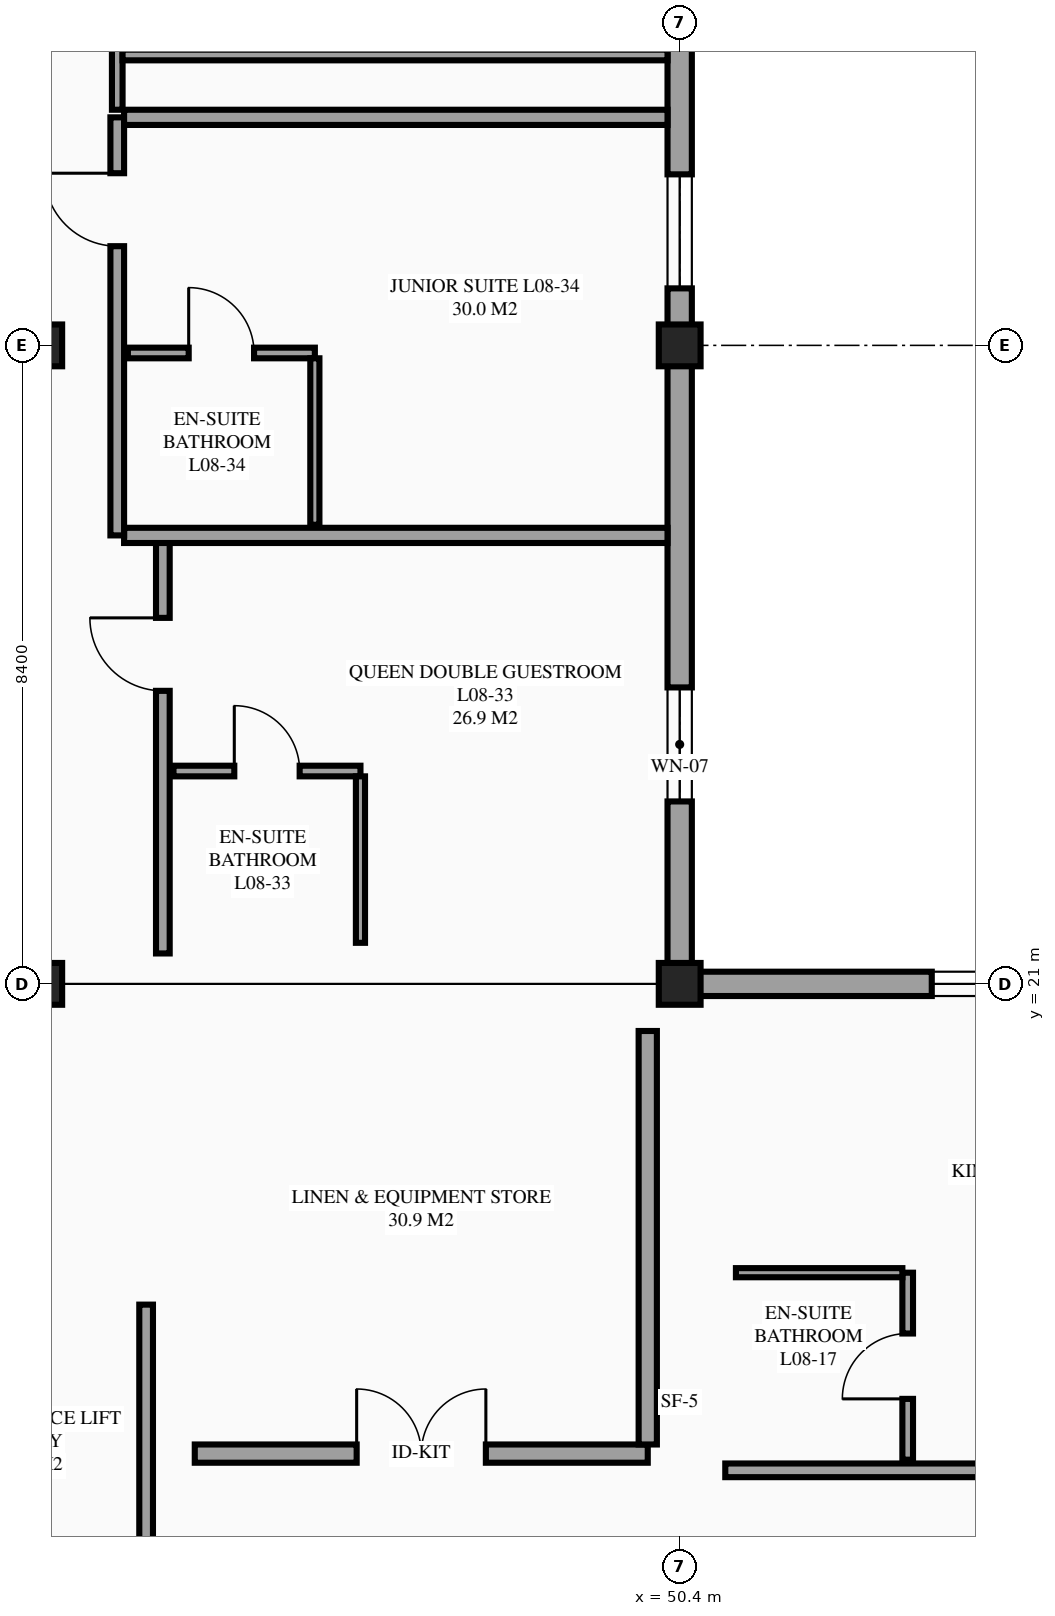
"""IFC4 building model, lengths in metres.
Left out: names, types, materials, properties, quantities, classifications, styles, units other than length and angle.
Written with IfcOpenShell. Run it as: python <this file> out.ifc"""

import sys

from ifc_helpers import new_model, si_unit, direction, frame, frame_2d, origin, origin_2d, place, context, subcontext, project, spatial, rectangle, extrude, element, fill, save


model = new_model("IFC4")
c1 = context("Model", 3, precision=1e-05, world=origin(), true_north=direction((0.0, 1.0)))
c2 = subcontext(c1, "Body", "Model", "MODEL_VIEW")
j1 = project(units=[si_unit("LENGTHUNIT", "METRE"), si_unit("PLANEANGLEUNIT", "RADIAN")], contexts=[c1])
p1 = place(None, origin())
s1 = spatial("IfcSite", under=j1, at=p1, CompositionType="ELEMENT")
p2 = place(p1, origin())
s2 = spatial("IfcBuilding", under=s1, at=p2, CompositionType="ELEMENT")
p3 = place(p2, frame((0.0, 0.0, 32.7)))
s3 = spatial("IfcBuildingStorey", under=s2, at=p3, CompositionType="ELEMENT", Elevation=32.7)
for number, where, z_axis, x_axis in (
    (1, (42.0, 21.0, 0.0), (0.0, 0.0, 1.0), (1.0, 0.0, 0.0)),
    (2, (42.0, 29.4, 0.0), (0.0, 0.0, 1.0), (1.0, 0.0, 0.0)),
    (3, (50.4, 21.0, 0.0), (0.0, 0.0, 1.0), (1.0, 0.0, 0.0)),
    (4, (50.4, 29.4, 0.0), (0.0, 0.0, 1.0), (1.0, 0.0, 0.0)),
):
    element("IfcColumn", number, at=place(p3, frame(where, z_axis=z_axis, x_axis=x_axis)), inside=s3, PredefinedType="COLUMN", context=c2, shape_type="SweptSolid", body=[
        extrude(rectangle(XDim=0.55, YDim=0.55, at=origin_2d()), origin(), (0.0, 0.0, 1.0), 3.6),
    ])
p4 = place(p3, frame((50.4, 21.0, 0.0), z_axis=(0.0, 0.0, 1.0), x_axis=(0.0, 1.0, 0.0)))
e5 = element("IfcWall", 5, at=p4, inside=s3, PredefinedType="STANDARD", context=c2, shape_type="SweptSolid", body=[
    extrude(rectangle(XDim=16.8, YDim=0.32, at=frame_2d((8.4, 0.0))), origin(), (0.0, 0.0, 1.0), 2.48),
])
p5 = place(p4, frame((2.4, 0.0, 0.85)))
e6 = element("IfcOpeningElement", 6, at=p5, cuts=e5, PredefinedType="OPENING", context=c2, shape_type="SweptSolid", body=[
    extrude(rectangle(XDim=1.5, YDim=1.5, at=frame_2d((0.75, 0.75))), frame((0.0, 0.17, 0.0), z_axis=(0.0, -1.0, 0.0), x_axis=(1.0, 0.0, 0.0)), (0.0, 0.0, 1.0), 0.34),
])
p6 = place(p4, frame((9.15, 0.0, 0.85)))
e7 = element("IfcOpeningElement", 7, at=p6, cuts=e5, PredefinedType="OPENING", context=c2, shape_type="SweptSolid", body=[
    extrude(rectangle(XDim=1.5, YDim=1.5, at=frame_2d((0.75, 0.75))), frame((0.0, 0.17, 0.0), z_axis=(0.0, -1.0, 0.0), x_axis=(1.0, 0.0, 0.0)), (0.0, 0.0, 1.0), 0.34),
])
p7 = place(p3, frame((51.0, 14.6, 0.0), z_axis=(0.0, 0.0, 1.0), x_axis=(1.0, 0.0, 0.0)))
e8 = element("IfcWall", 8, at=p7, inside=s3, PredefinedType="PARTITIONING", context=c2, shape_type="SweptSolid", body=[
    extrude(rectangle(XDim=6.933, YDim=0.18, at=frame_2d((3.467, 0.0))), origin(), (0.0, 0.0, 1.0), 3.375),
])
p8 = place(p7, frame((4.686, 0.0, 0.0)))
e9 = element("IfcOpeningElement", 9, at=p8, cuts=e8, PredefinedType="OPENING", context=c2, shape_type="SweptSolid", body=[
    extrude(rectangle(XDim=0.96, YDim=2.15, at=frame_2d((0.48, 1.075))), frame((0.0, 0.1, 0.0), z_axis=(0.0, -1.0, 0.0), x_axis=(1.0, 0.0, 0.0)), (0.0, 0.0, 1.0), 0.2),
])
p9 = place(p3, frame((53.4, 14.74, 0.0), z_axis=(0.0, 0.0, 1.0), x_axis=(0.0, 1.0, 0.0)))
e10 = element("IfcWall", 10, at=p9, inside=s3, PredefinedType="PARTITIONING", context=c2, shape_type="SweptSolid", body=[
    extrude(rectangle(XDim=2.46, YDim=0.14, at=frame_2d((1.23, 0.0))), origin(), (0.0, 0.0, 1.0), 3.375),
])
p10 = place(p9, frame((0.8, 0.0, 0.0)))
e11 = element("IfcOpeningElement", 11, at=p10, cuts=e10, PredefinedType="OPENING", context=c2, shape_type="SweptSolid", body=[
    extrude(rectangle(XDim=0.86, YDim=2.1, at=frame_2d((0.43, 1.05))), frame((0.0, 0.08, 0.0), z_axis=(0.0, -1.0, 0.0), x_axis=(1.0, 0.0, 0.0)), (0.0, 0.0, 1.0), 0.16),
])
p11 = place(p3, frame((51.14, 17.2, 0.0), z_axis=(0.0, 0.0, 1.0), x_axis=(1.0, 0.0, 0.0)))
e12 = element("IfcWall", 12, at=p11, inside=s3, PredefinedType="PARTITIONING", context=c2, shape_type="SweptSolid", body=[
    extrude(rectangle(XDim=2.19, YDim=0.12, at=frame_2d((1.095, 0.0))), origin(), (0.0, 0.0, 1.0), 3.375),
])
p12 = place(p3, frame((43.6, 21.4, 0.0), z_axis=(0.0, 0.0, 1.0), x_axis=(0.0, 1.0, 0.0)))
e13 = element("IfcWall", 13, at=p12, inside=s3, PredefinedType="PARTITIONING", context=c2, shape_type="SweptSolid", body=[
    extrude(rectangle(XDim=5.5, YDim=0.18, at=frame_2d((2.75, 0.0))), origin(), (0.0, 0.0, 1.0), 3.375),
])
p13 = place(p12, frame((3.455, 0.0, 0.0)))
e14 = element("IfcOpeningElement", 14, at=p13, cuts=e13, PredefinedType="OPENING", context=c2, shape_type="SweptSolid", body=[
    extrude(rectangle(XDim=0.96, YDim=2.15, at=frame_2d((0.48, 1.075))), frame((0.0, 0.1, 0.0), z_axis=(0.0, -1.0, 0.0), x_axis=(1.0, 0.0, 0.0)), (0.0, 0.0, 1.0), 0.2),
])
p14 = place(p3, frame((43.09, 26.9, 0.0), z_axis=(0.0, 0.0, 1.0), x_axis=(1.0, 0.0, 0.0)))
e15 = element("IfcWall", 15, at=p14, inside=s3, PredefinedType="PARTITIONING", context=c2, shape_type="SweptSolid", body=[
    extrude(rectangle(XDim=7.15, YDim=0.2, at=frame_2d((3.575, 0.0))), origin(), (0.0, 0.0, 1.0), 3.375),
])
p15 = place(p3, frame((43.74, 23.8, 0.0), z_axis=(0.0, 0.0, 1.0), x_axis=(1.0, 0.0, 0.0)))
e16 = element("IfcWall", 16, at=p15, inside=s3, PredefinedType="PARTITIONING", context=c2, shape_type="SweptSolid", body=[
    extrude(rectangle(XDim=2.46, YDim=0.14, at=frame_2d((1.23, 0.0))), origin(), (0.0, 0.0, 1.0), 3.375),
])
p16 = place(p15, frame((0.8, 0.0, 0.0)))
e17 = element("IfcOpeningElement", 17, at=p16, cuts=e16, PredefinedType="OPENING", context=c2, shape_type="SweptSolid", body=[
    extrude(rectangle(XDim=0.86, YDim=2.1, at=frame_2d((0.43, 1.05))), frame((0.0, 0.08, 0.0), z_axis=(0.0, -1.0, 0.0), x_axis=(1.0, 0.0, 0.0)), (0.0, 0.0, 1.0), 0.16),
])
p17 = place(p3, frame((46.2, 21.54, 0.0), z_axis=(0.0, 0.0, 1.0), x_axis=(0.0, 1.0, 0.0)))
e18 = element("IfcWall", 18, at=p17, inside=s3, PredefinedType="PARTITIONING", context=c2, shape_type="SweptSolid", body=[
    extrude(rectangle(XDim=2.19, YDim=0.12, at=frame_2d((1.095, 0.0))), origin(), (0.0, 0.0, 1.0), 3.375),
])
p18 = place(p3, frame((43.0, 26.9, 0.0), z_axis=(0.0, 0.0, 1.0), x_axis=(0.0, 1.0, 0.0)))
e19 = element("IfcWall", 19, at=p18, inside=s3, PredefinedType="PARTITIONING", context=c2, shape_type="SweptSolid", body=[
    extrude(rectangle(XDim=5.5, YDim=0.18, at=frame_2d((2.75, 0.0))), origin(), (0.0, 0.0, 1.0), 3.375),
])
p19 = place(p18, frame((3.805, 0.0, 0.0)))
e20 = element("IfcOpeningElement", 20, at=p19, cuts=e19, PredefinedType="OPENING", context=c2, shape_type="SweptSolid", body=[
    extrude(rectangle(XDim=0.96, YDim=2.15, at=frame_2d((0.48, 1.075))), frame((0.0, 0.1, 0.0), z_axis=(0.0, -1.0, 0.0), x_axis=(1.0, 0.0, 0.0)), (0.0, 0.0, 1.0), 0.2),
])
p20 = place(p3, frame((43.09, 32.4, 0.0), z_axis=(0.0, 0.0, 1.0), x_axis=(1.0, 0.0, 0.0)))
e21 = element("IfcWall", 21, at=p20, inside=s3, PredefinedType="PARTITIONING", context=c2, shape_type="SweptSolid", body=[
    extrude(rectangle(XDim=7.15, YDim=0.2, at=frame_2d((3.575, 0.0))), origin(), (0.0, 0.0, 1.0), 3.375),
])
p21 = place(p3, frame((43.14, 29.3, 0.0), z_axis=(0.0, 0.0, 1.0), x_axis=(1.0, 0.0, 0.0)))
e22 = element("IfcWall", 22, at=p21, inside=s3, PredefinedType="PARTITIONING", context=c2, shape_type="SweptSolid", body=[
    extrude(rectangle(XDim=2.46, YDim=0.14, at=frame_2d((1.23, 0.0))), origin(), (0.0, 0.0, 1.0), 2.68),
])
p22 = place(p21, frame((0.8, 0.0, 0.0)))
e23 = element("IfcOpeningElement", 23, at=p22, cuts=e22, PredefinedType="OPENING", context=c2, shape_type="SweptSolid", body=[
    extrude(rectangle(XDim=0.86, YDim=2.1, at=frame_2d((0.43, 1.05))), frame((0.0, 0.08, 0.0), z_axis=(0.0, -1.0, 0.0), x_axis=(1.0, 0.0, 0.0)), (0.0, 0.0, 1.0), 0.16),
])
p23 = place(p3, frame((45.6, 27.04, 0.0), z_axis=(0.0, 0.0, 1.0), x_axis=(0.0, 1.0, 0.0)))
e24 = element("IfcWall", 24, at=p23, inside=s3, PredefinedType="PARTITIONING", context=c2, shape_type="SweptSolid", body=[
    extrude(rectangle(XDim=2.19, YDim=0.12, at=frame_2d((1.095, 0.0))), origin(), (0.0, 0.0, 1.0), 3.375),
])
p24 = place(p3, frame((43.38, 12.91, 0.0), z_axis=(0.0, 0.0, 1.0), x_axis=(0.0, 1.0, 0.0)))
e25 = element("IfcWall", 25, at=p24, inside=s3, PredefinedType="PARTITIONING", context=c2, shape_type="SweptSolid", body=[
    extrude(rectangle(XDim=3.87, YDim=0.18, at=frame_2d((1.935, 0.0))), origin(), (0.0, 0.0, 1.0), 3.375),
])
p25 = place(p3, frame((44.02, 14.82, 0.0), z_axis=(0.0, 0.0, 1.0), x_axis=(1.0, 0.0, 0.0)))
e26 = element("IfcWall", 26, at=p25, inside=s3, PredefinedType="PARTITIONING", context=c2, shape_type="SweptSolid", body=[
    extrude(rectangle(XDim=5.96, YDim=0.24, at=frame_2d((2.98, 0.0))), origin(), (0.0, 0.0, 1.0), 3.375),
])
p26 = place(p25, frame((2.13, 0.0, 0.0)))
e27 = element("IfcOpeningElement", 27, at=p26, cuts=e26, PredefinedType="OPENING", context=c2, shape_type="SweptSolid", body=[
    extrude(rectangle(XDim=1.7, YDim=2.2, at=frame_2d((0.85, 1.1))), frame((0.0, 0.13, 0.0), z_axis=(0.0, -1.0, 0.0), x_axis=(1.0, 0.0, 0.0)), (0.0, 0.0, 1.0), 0.26),
])
p27 = place(p3, frame((49.98, 14.94, 0.0), z_axis=(0.0, 0.0, 1.0), x_axis=(0.0, 1.0, 0.0)))
e28 = element("IfcWall", 28, at=p27, inside=s3, PredefinedType="PARTITIONING", context=c2, shape_type="SweptSolid", body=[
    extrude(rectangle(XDim=5.44, YDim=0.24, at=frame_2d((2.72, 0.0))), origin(), (0.0, 0.0, 1.0), 3.375),
])
p28 = place(p3, frame((43.0, 32.5, 0.0), z_axis=(0.0, 0.0, 1.0), x_axis=(0.0, 1.0, 0.0)))
e29 = element("IfcWall", 29, at=p28, inside=s3, PredefinedType="PARTITIONING", context=c2, shape_type="SweptSolid", body=[
    extrude(rectangle(XDim=4.8, YDim=0.14, at=frame_2d((2.4, 0.0))), origin(), (0.0, 0.0, 1.0), 3.375),
])
p29 = place(p28, frame((2.05, 0.0, 0.0)))
e30 = element("IfcOpeningElement", 30, at=p29, cuts=e29, PredefinedType="OPENING", context=c2, shape_type="SweptSolid", body=[
    extrude(rectangle(XDim=0.9, YDim=2.12, at=frame_2d((0.45, 1.06))), frame((0.0, 0.08, 0.0), z_axis=(0.0, -1.0, 0.0), x_axis=(1.0, 0.0, 0.0)), (0.0, 0.0, 1.0), 0.16),
])
p30 = place(p3, frame((43.07, 33.22, 0.0), z_axis=(0.0, 0.0, 1.0), x_axis=(1.0, 0.0, 0.0)))
e31 = element("IfcWall", 31, at=p30, inside=s3, PredefinedType="PARTITIONING", context=c2, shape_type="SweptSolid", body=[
    extrude(rectangle(XDim=7.17, YDim=0.14, at=frame_2d((3.585, 0.0))), origin(), (0.0, 0.0, 1.0), 3.375),
])
p31 = place(p3, frame((58.8, 21.0, 0.0), z_axis=(0.0, 0.0, 1.0), x_axis=(-1.0, 0.0, 0.0)))
e32 = element("IfcWall", 32, at=p31, inside=s3, PredefinedType="STANDARD", context=c2, shape_type="SweptSolid", body=[
    extrude(rectangle(XDim=8.4, YDim=0.32, at=frame_2d((4.2, 0.0))), origin(), (0.0, 0.0, 1.0), 2.73),
])
p32 = place(p31, frame((3.583, 0.0, 0.85)))
e33 = element("IfcOpeningElement", 33, at=p32, cuts=e32, PredefinedType="OPENING", context=c2, shape_type="SweptSolid", body=[
    extrude(rectangle(XDim=1.5, YDim=1.5, at=frame_2d((0.75, 0.75))), frame((0.0, 0.17, 0.0), z_axis=(0.0, -1.0, 0.0), x_axis=(1.0, 0.0, 0.0)), (0.0, 0.0, 1.0), 0.34),
])
p33 = place(p32, origin())
e34 = element("IfcWindow", 34, at=p33, inside=s3, PartitioningType="SINGLE_PANEL", PredefinedType="WINDOW", context=c2, shape_type="SweptSolid", body=[
    extrude(rectangle(XDim=1.5, YDim=1.5, at=frame_2d((0.75, 0.75))), frame((0.0, 0.03, 0.0), z_axis=(0.0, -1.0, 0.0), x_axis=(1.0, 0.0, 0.0)), (0.0, 0.0, 1.0), 0.06),
])
fill(e33, e34)
p34 = place(p5, origin())
e35 = element("IfcWindow", 35, at=p34, inside=s3, PartitioningType="SINGLE_PANEL", PredefinedType="WINDOW", context=c2, shape_type="SweptSolid", body=[
    extrude(rectangle(XDim=1.5, YDim=1.5, at=frame_2d((0.75, 0.75))), frame((0.0, 0.03, 0.0), z_axis=(0.0, -1.0, 0.0), x_axis=(1.0, 0.0, 0.0)), (0.0, 0.0, 1.0), 0.06),
])
fill(e6, e35)
p35 = place(p6, origin())
e36 = element("IfcWindow", 36, at=p35, inside=s3, PartitioningType="SINGLE_PANEL", PredefinedType="WINDOW", context=c2, shape_type="SweptSolid", body=[
    extrude(rectangle(XDim=1.5, YDim=1.5, at=frame_2d((0.75, 0.75))), frame((0.0, 0.03, 0.0), z_axis=(0.0, -1.0, 0.0), x_axis=(1.0, 0.0, 0.0)), (0.0, 0.0, 1.0), 0.06),
])
fill(e7, e36)
p36 = place(p10, origin())
e37 = element("IfcDoor", 37, at=p36, inside=s3, OperationType="SINGLE_SWING_LEFT", PredefinedType="DOOR", context=c2, shape_type="SweptSolid", body=[
    extrude(rectangle(XDim=0.86, YDim=2.1, at=frame_2d((0.43, 1.05))), frame((0.0, 0.025, 0.0), z_axis=(0.0, -1.0, 0.0), x_axis=(1.0, 0.0, 0.0)), (0.0, 0.0, 1.0), 0.05),
])
fill(e11, e37)
p37 = place(p13, origin())
e38 = element("IfcDoor", 38, at=p37, inside=s3, OperationType="SINGLE_SWING_RIGHT", PredefinedType="DOOR", context=c2, shape_type="SweptSolid", body=[
    extrude(rectangle(XDim=0.96, YDim=2.15, at=frame_2d((0.48, 1.075))), frame((0.0, 0.025, 0.0), z_axis=(0.0, -1.0, 0.0), x_axis=(1.0, 0.0, 0.0)), (0.0, 0.0, 1.0), 0.05),
])
fill(e14, e38)
p38 = place(p16, origin())
e39 = element("IfcDoor", 39, at=p38, inside=s3, OperationType="SINGLE_SWING_LEFT", PredefinedType="DOOR", context=c2, shape_type="SweptSolid", body=[
    extrude(rectangle(XDim=0.86, YDim=2.1, at=frame_2d((0.43, 1.05))), frame((0.0, 0.025, 0.0), z_axis=(0.0, -1.0, 0.0), x_axis=(1.0, 0.0, 0.0)), (0.0, 0.0, 1.0), 0.05),
])
fill(e17, e39)
p39 = place(p19, origin())
e40 = element("IfcDoor", 40, at=p39, inside=s3, OperationType="SINGLE_SWING_RIGHT", PredefinedType="DOOR", context=c2, shape_type="SweptSolid", body=[
    extrude(rectangle(XDim=0.96, YDim=2.15, at=frame_2d((0.48, 1.075))), frame((0.0, 0.025, 0.0), z_axis=(0.0, -1.0, 0.0), x_axis=(1.0, 0.0, 0.0)), (0.0, 0.0, 1.0), 0.05),
])
fill(e20, e40)
p40 = place(p22, origin())
e41 = element("IfcDoor", 41, at=p40, inside=s3, OperationType="SINGLE_SWING_LEFT", PredefinedType="DOOR", context=c2, shape_type="SweptSolid", body=[
    extrude(rectangle(XDim=0.86, YDim=2.1, at=frame_2d((0.43, 1.05))), frame((0.0, 0.025, 0.0), z_axis=(0.0, -1.0, 0.0), x_axis=(1.0, 0.0, 0.0)), (0.0, 0.0, 1.0), 0.05),
])
fill(e23, e41)
p41 = place(p26, origin())
e42 = element("IfcDoor", 42, at=p41, inside=s3, OperationType="DOUBLE_DOOR_SINGLE_SWING", PredefinedType="DOOR", context=c2, shape_type="SweptSolid", body=[
    extrude(rectangle(XDim=1.7, YDim=2.2, at=frame_2d((0.85, 1.1))), frame((0.0, 0.025, 0.0), z_axis=(0.0, -1.0, 0.0), x_axis=(1.0, 0.0, 0.0)), (0.0, 0.0, 1.0), 0.05),
])
fill(e27, e42)
save(model, sys.argv[1])
